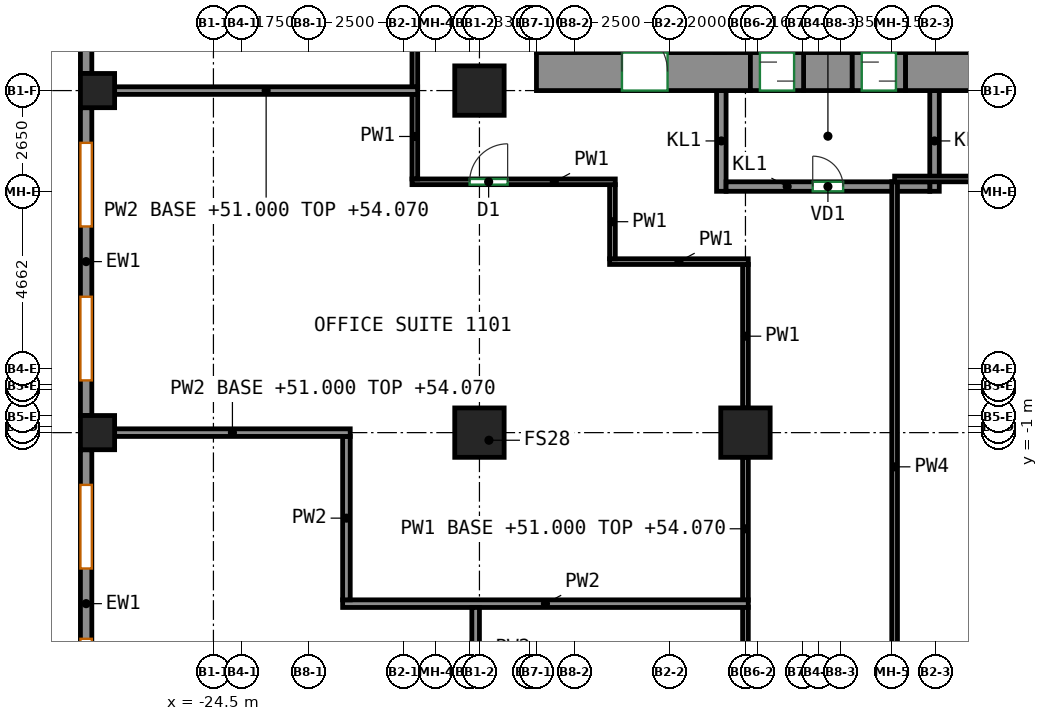
"""IFC4 building model, lengths in metres.
Left out: names, types, materials, properties, quantities, classifications, styles, units other than length and angle.
Written with IfcOpenShell. Run it as: python <this file> out.ifc"""

import sys

from ifc_helpers import new_model, si_unit, direction, frame, frame_2d, origin, origin_2d, place, context, subcontext, project, spatial, rectangle, extrude, source, transform, mapped, element, fill, save


model = new_model("IFC4")
c1 = context("Model", 3, precision=1e-05, world=origin(), true_north=direction((0.0, 1.0)))
c2 = subcontext(c1, "Body", "Model", "MODEL_VIEW")
j1 = project(units=[si_unit("LENGTHUNIT", "METRE"), si_unit("PLANEANGLEUNIT", "RADIAN")], contexts=[c1])
p1 = place(None, origin())
s1 = spatial("IfcSite", under=j1, at=p1, CompositionType="ELEMENT")
p2 = place(p1, origin())
s2 = spatial("IfcBuilding", under=s1, at=p2, CompositionType="ELEMENT")
p3 = place(p2, frame((0.0, 0.0, 51.0)))
s3 = spatial("IfcBuildingStorey", under=s2, at=p3, CompositionType="ELEMENT", Elevation=51.0)
m1 = source(origin(), c2, "Body", "SweptSolid", [
    extrude(rectangle(XDim=0.9, YDim=0.9, at=origin_2d()), origin(), (0.0, 0.0, 1.0), 3.72),
])
for number, where, z_axis, x_axis in (
    (1, (-27.55, -1.0, 0.0), (0.0, 0.0, 1.0), (1.0, 0.0, 0.0)),
    (2, (-27.55, 8.0, 0.0), (0.0, 0.0, 1.0), (1.0, 0.0, 0.0)),
):
    element("IfcColumn", number, at=place(p3, frame(where, z_axis=z_axis, x_axis=x_axis)), inside=s3, PredefinedType="COLUMN", context=c2, shape_type="MappedRepresentation", body=[
        mapped(m1, transform((0.0, 0.0, 0.0))),
    ])
m2 = source(origin(), c2, "Body", "SweptSolid", [
    extrude(rectangle(XDim=1.3, YDim=1.3, at=origin_2d()), origin(), (0.0, 0.0, 1.0), 3.72),
])
for number, where, z_axis, x_axis in (
    (3, (-17.5, -1.0, 0.0), (0.0, 0.0, 1.0), (1.0, 0.0, 0.0)),
    (4, (-17.5, 8.0, 0.0), (0.0, 0.0, 1.0), (1.0, 0.0, 0.0)),
    (5, (-10.5, -1.0, 0.0), (0.0, 0.0, 1.0), (1.0, 0.0, 0.0)),
):
    element("IfcColumn", number, at=place(p3, frame(where, z_axis=z_axis, x_axis=x_axis)), inside=s3, PredefinedType="COLUMN", context=c2, shape_type="MappedRepresentation", body=[
        mapped(m2, transform((0.0, 0.0, 0.0))),
    ])
m3 = source(origin(), c2, "Body", "SweptSolid", [
    extrude(rectangle(XDim=5.63, YDim=1.0, at=frame_2d((2.815, 0.0))), origin(), (0.0, 0.0, 1.0), 3.72),
])
p4 = place(p3, frame((-16.0, 8.5, 0.0), z_axis=(0.0, 0.0, 1.0), x_axis=(1.0, 0.0, 0.0)))
e6 = element("IfcWall", 6, at=p4, inside=s3, PredefinedType="SHEAR", context=c2, shape_type="MappedRepresentation", body=[
    mapped(m3, transform((0.0, 0.0, 0.0))),
])
p5 = place(p4, frame((2.25, 0.0, 0.0)))
e7 = element("IfcOpeningElement", 7, at=p5, cuts=e6, PredefinedType="OPENING", context=c2, shape_type="SweptSolid", body=[
    extrude(rectangle(XDim=1.2, YDim=2.1, at=frame_2d((0.6, 1.05))), frame((0.0, 0.51, 0.0), z_axis=(0.0, -1.0, 0.0), x_axis=(1.0, 0.0, 0.0)), (0.0, 0.0, 1.0), 1.02),
])
m4 = source(origin(), c2, "Body", "SweptSolid", [
    extrude(rectangle(XDim=1.28, YDim=1.0, at=frame_2d((0.64, 0.0))), origin(), (0.0, 0.0, 1.0), 3.72),
])
p6 = place(p3, frame((-8.97, 8.5, 0.0), z_axis=(0.0, 0.0, 1.0), x_axis=(1.0, 0.0, 0.0)))
e8 = element("IfcWall", 8, at=p6, inside=s3, PredefinedType="SHEAR", context=c2, shape_type="MappedRepresentation", body=[
    mapped(m4, transform((0.0, 0.0, 0.0))),
])
m5 = source(origin(), c2, "Body", "SweptSolid", [
    extrude(rectangle(XDim=14.18, YDim=1.0, at=frame_2d((7.09, 0.0))), origin(), (0.0, 0.0, 1.0), 3.72),
])
p7 = place(p3, frame((-6.29, 8.5, 0.0), z_axis=(0.0, 0.0, 1.0), x_axis=(1.0, 0.0, 0.0)))
e9 = element("IfcWall", 9, at=p7, inside=s3, PredefinedType="SHEAR", context=c2, shape_type="MappedRepresentation", body=[
    mapped(m5, transform((0.0, 0.0, 0.0))),
])
m6 = source(origin(), c2, "Body", "SweptSolid", [
    extrude(rectangle(XDim=15.282, YDim=0.3, at=frame_2d((7.641, 0.0))), origin(), (0.0, 0.0, 1.0), 3.72),
])
p8 = place(p3, frame((-27.85, 23.732, 0.0), z_axis=(0.0, 0.0, 1.0), x_axis=(0.0, -1.0, 0.0)))
e10 = element("IfcWall", 10, at=p8, inside=s3, PredefinedType="SOLIDWALL", context=c2, shape_type="MappedRepresentation", body=[
    mapped(m6, transform((0.0, 0.0, 0.0))),
])
p9 = place(p8, frame((0.81, 0.0, 0.7)))
e11 = element("IfcOpeningElement", 11, at=p9, cuts=e10, PredefinedType="OPENING", context=c2, shape_type="SweptSolid", body=[
    extrude(rectangle(XDim=2.2, YDim=2.25, at=frame_2d((1.1, 1.125))), frame((0.0, 0.16, 0.0), z_axis=(0.0, -1.0, 0.0), x_axis=(1.0, 0.0, 0.0)), (0.0, 0.0, 1.0), 0.32),
])
p10 = place(p8, frame((4.631, 0.0, 0.7)))
e12 = element("IfcOpeningElement", 12, at=p10, cuts=e10, PredefinedType="OPENING", context=c2, shape_type="SweptSolid", body=[
    extrude(rectangle(XDim=2.2, YDim=2.25, at=frame_2d((1.1, 1.125))), frame((0.0, 0.16, 0.0), z_axis=(0.0, -1.0, 0.0), x_axis=(1.0, 0.0, 0.0)), (0.0, 0.0, 1.0), 0.32),
])
p11 = place(p8, frame((8.451, 0.0, 0.7)))
e13 = element("IfcOpeningElement", 13, at=p11, cuts=e10, PredefinedType="OPENING", context=c2, shape_type="SweptSolid", body=[
    extrude(rectangle(XDim=2.2, YDim=2.25, at=frame_2d((1.1, 1.125))), frame((0.0, 0.16, 0.0), z_axis=(0.0, -1.0, 0.0), x_axis=(1.0, 0.0, 0.0)), (0.0, 0.0, 1.0), 0.32),
])
p12 = place(p8, frame((12.271, 0.0, 0.7)))
e14 = element("IfcOpeningElement", 14, at=p12, cuts=e10, PredefinedType="OPENING", context=c2, shape_type="SweptSolid", body=[
    extrude(rectangle(XDim=2.2, YDim=2.25, at=frame_2d((1.1, 1.125))), frame((0.0, 0.16, 0.0), z_axis=(0.0, -1.0, 0.0), x_axis=(1.0, 0.0, 0.0)), (0.0, 0.0, 1.0), 0.32),
])
m7 = source(origin(), c2, "Body", "SweptSolid", [
    extrude(rectangle(XDim=8.1, YDim=0.3, at=frame_2d((4.05, 0.0))), origin(), (0.0, 0.0, 1.0), 3.72),
])
p13 = place(p3, frame((-27.85, 7.55, 0.0), z_axis=(0.0, 0.0, 1.0), x_axis=(0.0, -1.0, 0.0)))
e15 = element("IfcWall", 15, at=p13, inside=s3, PredefinedType="SOLIDWALL", context=c2, shape_type="MappedRepresentation", body=[
    mapped(m7, transform((0.0, 0.0, 0.0))),
])
p14 = place(p13, frame((0.925, 0.0, 0.7)))
e16 = element("IfcOpeningElement", 16, at=p14, cuts=e15, PredefinedType="OPENING", context=c2, shape_type="SweptSolid", body=[
    extrude(rectangle(XDim=2.2, YDim=2.25, at=frame_2d((1.1, 1.125))), frame((0.0, 0.16, 0.0), z_axis=(0.0, -1.0, 0.0), x_axis=(1.0, 0.0, 0.0)), (0.0, 0.0, 1.0), 0.32),
])
p15 = place(p13, frame((4.975, 0.0, 0.7)))
e17 = element("IfcOpeningElement", 17, at=p15, cuts=e15, PredefinedType="OPENING", context=c2, shape_type="SweptSolid", body=[
    extrude(rectangle(XDim=2.2, YDim=2.25, at=frame_2d((1.1, 1.125))), frame((0.0, 0.16, 0.0), z_axis=(0.0, -1.0, 0.0), x_axis=(1.0, 0.0, 0.0)), (0.0, 0.0, 1.0), 0.32),
])
p16 = place(p3, frame((-27.85, -1.45, 0.0), z_axis=(0.0, 0.0, 1.0), x_axis=(0.0, -1.0, 0.0)))
e18 = element("IfcWall", 18, at=p16, inside=s3, PredefinedType="SOLIDWALL", context=c2, shape_type="MappedRepresentation", body=[
    mapped(m7, transform((0.0, 0.0, 0.0))),
])
p17 = place(p16, frame((0.925, 0.0, 0.7)))
e19 = element("IfcOpeningElement", 19, at=p17, cuts=e18, PredefinedType="OPENING", context=c2, shape_type="SweptSolid", body=[
    extrude(rectangle(XDim=2.2, YDim=2.25, at=frame_2d((1.1, 1.125))), frame((0.0, 0.16, 0.0), z_axis=(0.0, -1.0, 0.0), x_axis=(1.0, 0.0, 0.0)), (0.0, 0.0, 1.0), 0.32),
])
p18 = place(p16, frame((4.975, 0.0, 0.7)))
e20 = element("IfcOpeningElement", 20, at=p18, cuts=e18, PredefinedType="OPENING", context=c2, shape_type="SweptSolid", body=[
    extrude(rectangle(XDim=2.2, YDim=2.25, at=frame_2d((1.1, 1.125))), frame((0.0, 0.16, 0.0), z_axis=(0.0, -1.0, 0.0), x_axis=(1.0, 0.0, 0.0)), (0.0, 0.0, 1.0), 0.32),
])
m8 = source(origin(), c2, "Body", "SweptSolid", [
    extrude(rectangle(XDim=2.65, YDim=0.25, at=frame_2d((1.325, 0.0))), origin(), (0.0, 0.0, 1.0), 3.72),
])
for number, where, z_axis, x_axis in (
    (21, (-11.135, 5.35, 0.0), (0.0, 0.0, 1.0), (0.0, 1.0, 0.0)),
    (22, (-5.525, 5.35, 0.0), (0.0, 0.0, 1.0), (0.0, 1.0, 0.0)),
):
    element("IfcWall", number, at=place(p3, frame(where, z_axis=z_axis, x_axis=x_axis)), inside=s3, PredefinedType="PARTITIONING", context=c2, shape_type="MappedRepresentation", body=[
        mapped(m8, transform((0.0, 0.0, 0.0))),
    ])
m9 = source(origin(), c2, "Body", "SweptSolid", [
    extrude(rectangle(XDim=5.36, YDim=0.25, at=frame_2d((2.68, 0.0))), origin(), (0.0, 0.0, 1.0), 3.72),
])
p19 = place(p3, frame((-11.01, 5.475, 0.0), z_axis=(0.0, 0.0, 1.0), x_axis=(1.0, 0.0, 0.0)))
e23 = element("IfcWall", 23, at=p19, inside=s3, PredefinedType="PARTITIONING", context=c2, shape_type="MappedRepresentation", body=[
    mapped(m9, transform((0.0, 0.0, 0.0))),
])
p20 = place(p19, frame((2.28, 0.0, 0.0)))
e24 = element("IfcOpeningElement", 24, at=p20, cuts=e23, PredefinedType="OPENING", context=c2, shape_type="SweptSolid", body=[
    extrude(rectangle(XDim=0.8, YDim=2.0, at=frame_2d((0.4, 1.0))), frame((0.0, 0.135, 0.0), z_axis=(0.0, -1.0, 0.0), x_axis=(1.0, 0.0, 0.0)), (0.0, 0.0, 1.0), 0.27),
])
m10 = source(origin(), c2, "Body", "SweptSolid", [
    extrude(rectangle(XDim=1.4, YDim=1.0, at=frame_2d((0.7, 0.0))), origin(), (0.0, 0.0, 1.0), 2.7),
])
p21 = place(p3, frame((-10.37, 8.5, 0.0), z_axis=(0.0, 0.0, 1.0), x_axis=(1.0, 0.0, 0.0)))
e25 = element("IfcWall", 25, at=p21, inside=s3, PredefinedType="PARTITIONING", context=c2, shape_type="MappedRepresentation", body=[
    mapped(m10, transform((0.0, 0.0, 0.0))),
])
p22 = place(p21, frame((0.25, 0.0, 0.0)))
e26 = element("IfcOpeningElement", 26, at=p22, cuts=e25, PredefinedType="OPENING", context=c2, shape_type="SweptSolid", body=[
    extrude(rectangle(XDim=0.9, YDim=2.1, at=frame_2d((0.45, 1.05))), frame((0.0, 0.51, 0.0), z_axis=(0.0, -1.0, 0.0), x_axis=(1.0, 0.0, 0.0)), (0.0, 0.0, 1.0), 1.02),
])
m11 = source(origin(), c2, "Body", "SweptSolid", [
    extrude(rectangle(XDim=1.4, YDim=1.0, at=frame_2d((0.7, 0.0))), origin(), (0.0, 0.0, 1.0), 2.7),
])
p23 = place(p3, frame((-7.69, 8.5, 0.0), z_axis=(0.0, 0.0, 1.0), x_axis=(1.0, 0.0, 0.0)))
e27 = element("IfcWall", 27, at=p23, inside=s3, PredefinedType="PARTITIONING", context=c2, shape_type="MappedRepresentation", body=[
    mapped(m11, transform((0.0, 0.0, 0.0))),
])
p24 = place(p23, frame((0.25, 0.0, 0.0)))
e28 = element("IfcOpeningElement", 28, at=p24, cuts=e27, PredefinedType="OPENING", context=c2, shape_type="SweptSolid", body=[
    extrude(rectangle(XDim=0.9, YDim=2.1, at=frame_2d((0.45, 1.05))), frame((0.0, 0.51, 0.0), z_axis=(0.0, -1.0, 0.0), x_axis=(1.0, 0.0, 0.0)), (0.0, 0.0, 1.0), 1.02),
])
p25 = place(p3, frame((-10.5, -5.41, 0.0), z_axis=(0.0, 0.0, 1.0), x_axis=(0.0, 1.0, 0.0)))
e29 = element("IfcWall", 29, at=p25, inside=s3, PredefinedType="PARTITIONING", context=c2, shape_type="SweptSolid", body=[
    extrude(rectangle(XDim=3.76, YDim=0.15, at=frame_2d((1.88, 0.0))), origin(), (0.0, 0.0, 1.0), 3.07),
])
p26 = place(p3, frame((-10.5, -0.35, 0.0), z_axis=(0.0, 0.0, 1.0), x_axis=(0.0, 1.0, 0.0)))
e30 = element("IfcWall", 30, at=p26, inside=s3, PredefinedType="PARTITIONING", context=c2, shape_type="SweptSolid", body=[
    extrude(rectangle(XDim=3.775, YDim=0.15, at=frame_2d((1.888, 0.0))), origin(), (0.0, 0.0, 1.0), 3.72),
])
p27 = place(p3, frame((-14.075, 3.5, 0.0), z_axis=(0.0, 0.0, 1.0), x_axis=(1.0, 0.0, 0.0)))
e31 = element("IfcWall", 31, at=p27, inside=s3, PredefinedType="PARTITIONING", context=c2, shape_type="SweptSolid", body=[
    extrude(rectangle(XDim=3.65, YDim=0.15, at=frame_2d((1.825, 0.0))), origin(), (0.0, 0.0, 1.0), 3.72),
])
p28 = place(p3, frame((-14.0, 5.525, 0.0), z_axis=(0.0, 0.0, 1.0), x_axis=(0.0, -1.0, 0.0)))
e32 = element("IfcWall", 32, at=p28, inside=s3, PredefinedType="PARTITIONING", context=c2, shape_type="SweptSolid", body=[
    extrude(rectangle(XDim=1.95, YDim=0.15, at=frame_2d((0.975, 0.0))), origin(), (0.0, 0.0, 1.0), 3.72),
])
p29 = place(p3, frame((-19.275, 5.6, 0.0), z_axis=(0.0, 0.0, 1.0), x_axis=(1.0, 0.0, 0.0)))
e33 = element("IfcWall", 33, at=p29, inside=s3, PredefinedType="PARTITIONING", context=c2, shape_type="SweptSolid", body=[
    extrude(rectangle(XDim=5.35, YDim=0.15, at=frame_2d((2.675, 0.0))), origin(), (0.0, 0.0, 1.0), 3.72),
])
p30 = place(p29, frame((1.517, 0.0, 0.0)))
e34 = element("IfcOpeningElement", 34, at=p30, cuts=e33, PredefinedType="OPENING", context=c2, shape_type="SweptSolid", body=[
    extrude(rectangle(XDim=1.0, YDim=2.1, at=frame_2d((0.5, 1.05))), frame((0.0, 0.085, 0.0), z_axis=(0.0, -1.0, 0.0), x_axis=(1.0, 0.0, 0.0)), (0.0, 0.0, 1.0), 0.17),
])
p31 = place(p3, frame((-19.2, 5.675, 0.0), z_axis=(0.0, 0.0, 1.0), x_axis=(0.0, 1.0, 0.0)))
e35 = element("IfcWall", 35, at=p31, inside=s3, PredefinedType="PARTITIONING", context=c2, shape_type="SweptSolid", body=[
    extrude(rectangle(XDim=2.235, YDim=0.15, at=frame_2d((1.117, 0.0))), origin(), (0.0, 0.0, 1.0), 3.72),
])
p32 = place(p3, frame((-10.5, -9.35, 0.0), z_axis=(0.0, 0.0, 1.0), x_axis=(0.0, 1.0, 0.0)))
e36 = element("IfcWall", 36, at=p32, inside=s3, PredefinedType="PARTITIONING", context=c2, shape_type="SweptSolid", body=[
    extrude(rectangle(XDim=3.76, YDim=0.15, at=frame_2d((1.88, 0.0))), origin(), (0.0, 0.0, 1.0), 3.07),
])
p33 = place(p3, frame((-19.2, 8.09, 0.0), z_axis=(0.0, 0.0, 1.0), x_axis=(0.0, 1.0, 0.0)))
e37 = element("IfcWall", 37, at=p33, inside=s3, PredefinedType="PARTITIONING", context=c2, shape_type="SweptSolid", body=[
    extrude(rectangle(XDim=16.31, YDim=0.15, at=frame_2d((8.155, 0.0))), origin(), (0.0, 0.0, 1.0), 3.72),
])
p34 = place(p33, frame((9.706, 0.0, 0.0)))
e38 = element("IfcOpeningElement", 38, at=p34, cuts=e37, PredefinedType="OPENING", context=c2, shape_type="SweptSolid", body=[
    extrude(rectangle(XDim=1.0, YDim=2.1, at=frame_2d((0.5, 1.05))), frame((0.0, 0.085, 0.0), z_axis=(0.0, -1.0, 0.0), x_axis=(1.0, 0.0, 0.0)), (0.0, 0.0, 1.0), 0.17),
])
p35 = place(p3, frame((-21.1, -5.5, 0.0), z_axis=(0.0, 0.0, 1.0), x_axis=(1.0, 0.0, 0.0)))
e39 = element("IfcWall", 39, at=p35, inside=s3, PredefinedType="PARTITIONING", context=c2, shape_type="SweptSolid", body=[
    extrude(rectangle(XDim=10.674, YDim=0.2, at=frame_2d((5.337, 0.0))), origin(), (0.0, 0.0, 1.0), 3.72),
])
p36 = place(p3, frame((-21.0, -5.4, 0.0), z_axis=(0.0, 0.0, 1.0), x_axis=(0.0, 1.0, 0.0)))
e40 = element("IfcWall", 40, at=p36, inside=s3, PredefinedType="PARTITIONING", context=c2, shape_type="SweptSolid", body=[
    extrude(rectangle(XDim=4.3, YDim=0.2, at=frame_2d((2.15, 0.0))), origin(), (0.0, 0.0, 1.0), 3.72),
])
p37 = place(p3, frame((-27.1, -1.0, 0.0), z_axis=(0.0, 0.0, 1.0), x_axis=(1.0, 0.0, 0.0)))
e41 = element("IfcWall", 41, at=p37, inside=s3, PredefinedType="PARTITIONING", context=c2, shape_type="SweptSolid", body=[
    extrude(rectangle(XDim=6.2, YDim=0.2, at=frame_2d((3.1, 0.0))), origin(), (0.0, 0.0, 1.0), 3.07),
])
p38 = place(p3, frame((-19.126, 8.0, 0.0), z_axis=(0.0, 0.0, 1.0), x_axis=(-1.0, 0.0, 0.0)))
e42 = element("IfcWall", 42, at=p38, inside=s3, PredefinedType="PARTITIONING", context=c2, shape_type="SweptSolid", body=[
    extrude(rectangle(XDim=7.974, YDim=0.2, at=frame_2d((3.987, 0.0))), origin(), (0.0, 0.0, 1.0), 3.07),
])
p39 = place(p3, frame((-17.6, -7.75, 0.0), z_axis=(0.0, 0.0, 1.0), x_axis=(0.0, 1.0, 0.0)))
e43 = element("IfcWall", 43, at=p39, inside=s3, PredefinedType="PARTITIONING", context=c2, shape_type="SweptSolid", body=[
    extrude(rectangle(XDim=2.15, YDim=0.2, at=frame_2d((1.075, 0.0))), origin(), (0.0, 0.0, 1.0), 3.72),
])
p40 = place(p3, frame((-6.575, -9.4, 0.0), z_axis=(0.0, 0.0, 1.0), x_axis=(0.0, 1.0, 0.0)))
e44 = element("IfcWall", 44, at=p40, inside=s3, PredefinedType="PARTITIONING", context=c2, shape_type="SweptSolid", body=[
    extrude(rectangle(XDim=15.0, YDim=0.15, at=frame_2d((7.5, 0.0))), origin(), (0.0, 0.0, 1.0), 3.72),
])
p41 = place(p3, frame((-6.575, 5.675, 0.0), z_axis=(0.0, 0.0, 1.0), x_axis=(1.0, 0.0, 0.0)))
e45 = element("IfcWall", 45, at=p41, inside=s3, PredefinedType="PARTITIONING", context=c2, shape_type="SweptSolid", body=[
    extrude(rectangle(XDim=15.075, YDim=0.15, at=frame_2d((7.538, 0.0))), origin(), (0.0, 0.0, 1.0), 3.72),
])
p42 = place(p14, origin())
e46 = element("IfcWindow", 46, at=p42, inside=s3, PartitioningType="SINGLE_PANEL", PredefinedType="WINDOW", context=c2, shape_type="SweptSolid", body=[
    extrude(rectangle(XDim=2.2, YDim=2.25, at=frame_2d((1.1, 1.125))), frame((0.0, 0.03, 0.0), z_axis=(0.0, -1.0, 0.0), x_axis=(1.0, 0.0, 0.0)), (0.0, 0.0, 1.0), 0.06),
])
fill(e16, e46)
p43 = place(p15, origin())
e47 = element("IfcWindow", 47, at=p43, inside=s3, PartitioningType="SINGLE_PANEL", PredefinedType="WINDOW", context=c2, shape_type="SweptSolid", body=[
    extrude(rectangle(XDim=2.2, YDim=2.25, at=frame_2d((1.1, 1.125))), frame((0.0, 0.03, 0.0), z_axis=(0.0, -1.0, 0.0), x_axis=(1.0, 0.0, 0.0)), (0.0, 0.0, 1.0), 0.06),
])
fill(e17, e47)
p44 = place(p17, origin())
e48 = element("IfcWindow", 48, at=p44, inside=s3, PartitioningType="SINGLE_PANEL", PredefinedType="WINDOW", context=c2, shape_type="SweptSolid", body=[
    extrude(rectangle(XDim=2.2, YDim=2.25, at=frame_2d((1.1, 1.125))), frame((0.0, 0.03, 0.0), z_axis=(0.0, -1.0, 0.0), x_axis=(1.0, 0.0, 0.0)), (0.0, 0.0, 1.0), 0.06),
])
fill(e19, e48)
p45 = place(p18, origin())
e49 = element("IfcWindow", 49, at=p45, inside=s3, PartitioningType="SINGLE_PANEL", PredefinedType="WINDOW", context=c2, shape_type="SweptSolid", body=[
    extrude(rectangle(XDim=2.2, YDim=2.25, at=frame_2d((1.1, 1.125))), frame((0.0, 0.03, 0.0), z_axis=(0.0, -1.0, 0.0), x_axis=(1.0, 0.0, 0.0)), (0.0, 0.0, 1.0), 0.06),
])
fill(e20, e49)
p46 = place(p20, origin())
e50 = element("IfcDoor", 50, at=p46, inside=s3, OperationType="SINGLE_SWING_LEFT", PredefinedType="DOOR", context=c2, shape_type="SweptSolid", body=[
    extrude(rectangle(XDim=0.8, YDim=2.0, at=frame_2d((0.4, 1.0))), frame((0.0, 0.025, 0.0), z_axis=(0.0, -1.0, 0.0), x_axis=(1.0, 0.0, 0.0)), (0.0, 0.0, 1.0), 0.05),
])
fill(e24, e50)
p47 = place(p22, origin())
e51 = element("IfcDoor", 51, at=p47, inside=s3, OperationType="SLIDING_TO_LEFT", PredefinedType="DOOR", context=c2, shape_type="SweptSolid", body=[
    extrude(rectangle(XDim=0.9, YDim=2.1, at=frame_2d((0.45, 1.05))), frame((0.0, 0.405, 0.0), z_axis=(0.0, -1.0, 0.0), x_axis=(1.0, 0.0, 0.0)), (0.0, 0.0, 1.0), 0.05),
])
fill(e26, e51)
p48 = place(p24, origin())
e52 = element("IfcDoor", 52, at=p48, inside=s3, OperationType="SLIDING_TO_RIGHT", PredefinedType="DOOR", context=c2, shape_type="SweptSolid", body=[
    extrude(rectangle(XDim=0.9, YDim=2.1, at=frame_2d((0.45, 1.05))), frame((0.0, 0.405, 0.0), z_axis=(0.0, -1.0, 0.0), x_axis=(1.0, 0.0, 0.0)), (0.0, 0.0, 1.0), 0.05),
])
fill(e28, e52)
p49 = place(p5, origin())
e53 = element("IfcDoor", 53, at=p49, inside=s3, OperationType="DOUBLE_DOOR_SINGLE_SWING", PredefinedType="DOOR", context=c2, shape_type="SweptSolid", body=[
    extrude(rectangle(XDim=1.2, YDim=2.1, at=frame_2d((0.6, 1.05))), frame((0.0, 0.405, 0.0), z_axis=(0.0, -1.0, 0.0), x_axis=(1.0, 0.0, 0.0)), (0.0, 0.0, 1.0), 0.05),
])
fill(e7, e53)
p50 = place(p30, origin())
e54 = element("IfcDoor", 54, at=p50, inside=s3, OperationType="SINGLE_SWING_RIGHT", PredefinedType="DOOR", context=c2, shape_type="SweptSolid", body=[
    extrude(rectangle(XDim=1.0, YDim=2.1, at=frame_2d((0.5, 1.05))), frame((0.0, 0.025, 0.0), z_axis=(0.0, -1.0, 0.0), x_axis=(1.0, 0.0, 0.0)), (0.0, 0.0, 1.0), 0.05),
])
fill(e34, e54)
save(model, sys.argv[1])
